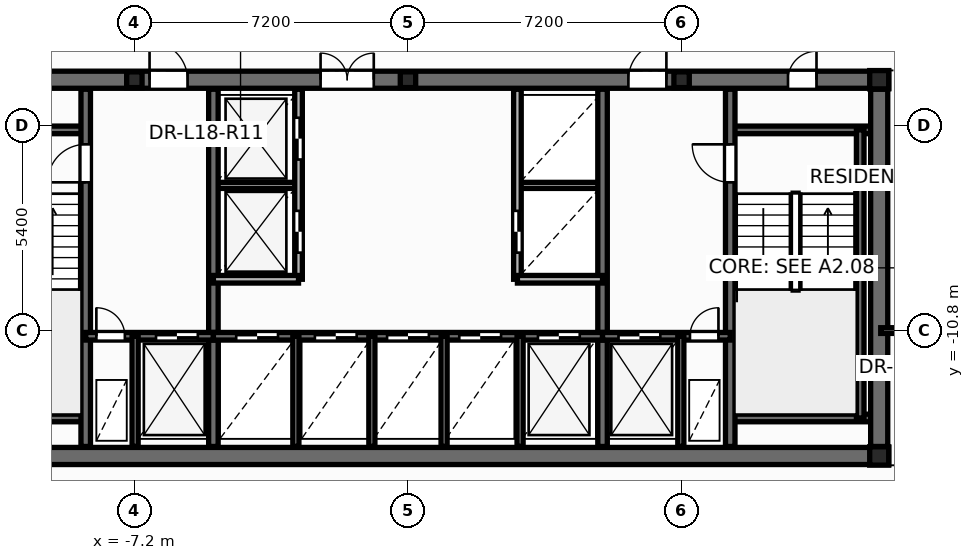
"""IFC4 building model, lengths in metres.
Left out: names, types, materials, properties, quantities, classifications, styles, units other than length and angle.
Written with IfcOpenShell. Run it as: python <this file> out.ifc"""

import sys

from ifc_helpers import new_model, si_unit, direction, frame, frame_2d, origin, origin_2d, place, context, subcontext, project, spatial, rectangle, i_section, extrude, element, fill, save


model = new_model("IFC4")
c1 = context("Model", 3, precision=1e-05, world=origin(), true_north=direction((0.0, 1.0)))
c2 = subcontext(c1, "Body", "Model", "MODEL_VIEW")
j1 = project(units=[si_unit("LENGTHUNIT", "METRE"), si_unit("PLANEANGLEUNIT", "RADIAN")], contexts=[c1])
p1 = place(None, origin())
s1 = spatial("IfcSite", under=j1, at=p1, CompositionType="ELEMENT")
p2 = place(p1, origin())
s2 = spatial("IfcBuilding", under=s1, at=p2, CompositionType="ELEMENT")
p3 = place(p2, frame((0.0, 0.0, 72.0)))
s3 = spatial("IfcBuildingStorey", under=s2, at=p3, CompositionType="ELEMENT", Elevation=72.0)
for number, where, z_axis, x_axis in (
    (1, (12.4, -14.1, 0.0), (0.0, 0.0, 1.0), (1.0, 0.0, 0.0)),
    (2, (12.4, -4.2, 0.0), (0.0, 0.0, 1.0), (1.0, 0.0, 0.0)),
):
    element("IfcColumn", number, at=place(p3, frame(where, z_axis=z_axis, x_axis=x_axis)), inside=s3, PredefinedType="COLUMN", context=c2, shape_type="SweptSolid", body=[
        extrude(i_section(OverallWidth=0.5, OverallDepth=0.482, WebThickness=0.04, FlangeThickness=0.045, at=origin_2d()), origin(), (0.0, 0.0, 1.0), 3.6),
    ])
for number, where, z_axis, x_axis in (
    (3, (-7.2, -4.2, 0.0), (0.0, 0.0, 1.0), (1.0, 0.0, 0.0)),
    (4, (0.0, -4.2, 0.0), (0.0, 0.0, 1.0), (1.0, 0.0, 0.0)),
    (5, (7.2, -4.2, 0.0), (0.0, 0.0, 1.0), (1.0, 0.0, 0.0)),
):
    element("IfcColumn", number, at=place(p3, frame(where, z_axis=z_axis, x_axis=x_axis)), inside=s3, PredefinedType="PILASTER", context=c2, shape_type="SweptSolid", body=[
        extrude(i_section(OverallWidth=0.405, OverallDepth=0.414, WebThickness=0.022, FlangeThickness=0.032, at=origin_2d()), origin(), (0.0, 0.0, 1.0), 3.6),
    ])
for number, where, z_axis, x_axis in (
    (6, (-5.12, -6.98, 0.0), (0.0, 0.0, 1.0), (1.0, 0.0, 0.0)),
    (7, (2.88, -6.98, 0.0), (0.0, 0.0, 1.0), (1.0, 0.0, 0.0)),
):
    element("IfcWall", number, at=place(p3, frame(where, z_axis=z_axis, x_axis=x_axis)), inside=s3, PredefinedType="PARTITIONING", context=c2, shape_type="SweptSolid", body=[
        extrude(rectangle(XDim=2.24, YDim=0.16, at=frame_2d((1.12, 0.0))), origin(), (0.0, 0.0, 1.0), 3.35),
    ])
p4 = place(p3, frame((-12.65, -14.1, 0.0), z_axis=(0.0, 0.0, 1.0), x_axis=(1.0, 0.0, 0.0)))
e8 = element("IfcWall", 8, at=p4, inside=s3, PredefinedType="SHEAR", context=c2, shape_type="SweptSolid", body=[
    extrude(rectangle(XDim=25.3, YDim=0.45, at=frame_2d((12.65, 0.0))), origin(), (0.0, 0.0, 1.0), 3.6),
])
p5 = place(p3, frame((-12.65, -4.2, 0.0), z_axis=(0.0, 0.0, 1.0), x_axis=(1.0, 0.0, 0.0)))
e9 = element("IfcWall", 9, at=p5, inside=s3, PredefinedType="SHEAR", context=c2, shape_type="SweptSolid", body=[
    extrude(rectangle(XDim=25.3, YDim=0.45, at=frame_2d((12.65, 0.0))), origin(), (0.0, 0.0, 1.0), 3.6),
])
p6 = place(p5, frame((1.85, 0.0, 0.0)))
e10 = element("IfcOpeningElement", 10, at=p6, cuts=e9, PredefinedType="OPENING", context=c2, shape_type="SweptSolid", body=[
    extrude(rectangle(XDim=0.756, YDim=2.054, at=frame_2d((0.375, 1.027))), frame((0.0, 0.235, 0.0), z_axis=(0.0, -1.0, 0.0), x_axis=(1.0, 0.0, 0.0)), (0.0, 0.0, 1.0), 0.47),
])
p7 = place(p5, frame((22.65, 0.0, 0.0)))
e11 = element("IfcOpeningElement", 11, at=p7, cuts=e9, PredefinedType="OPENING", context=c2, shape_type="SweptSolid", body=[
    extrude(rectangle(XDim=0.756, YDim=2.054, at=frame_2d((0.375, 1.027))), frame((0.0, 0.235, 0.0), z_axis=(0.0, -1.0, 0.0), x_axis=(1.0, 0.0, 0.0)), (0.0, 0.0, 1.0), 0.47),
])
p8 = place(p5, frame((5.85, 0.0, 0.0)))
e12 = element("IfcOpeningElement", 12, at=p8, cuts=e9, PredefinedType="OPENING", context=c2, shape_type="SweptSolid", body=[
    extrude(rectangle(XDim=1.006, YDim=2.104, at=frame_2d((0.5, 1.052))), frame((0.0, 0.235, 0.0), z_axis=(0.0, -1.0, 0.0), x_axis=(1.0, 0.0, 0.0)), (0.0, 0.0, 1.0), 0.47),
])
p9 = place(p5, frame((10.35, 0.0, 0.0)))
e13 = element("IfcOpeningElement", 13, at=p9, cuts=e9, PredefinedType="OPENING", context=c2, shape_type="SweptSolid", body=[
    extrude(rectangle(XDim=1.406, YDim=2.154, at=frame_2d((0.7, 1.077))), frame((0.0, 0.235, 0.0), z_axis=(0.0, -1.0, 0.0), x_axis=(1.0, 0.0, 0.0)), (0.0, 0.0, 1.0), 0.47),
])
p10 = place(p5, frame((18.45, 0.0, 0.0)))
e14 = element("IfcOpeningElement", 14, at=p10, cuts=e9, PredefinedType="OPENING", context=c2, shape_type="SweptSolid", body=[
    extrude(rectangle(XDim=1.006, YDim=2.104, at=frame_2d((0.5, 1.052))), frame((0.0, 0.235, 0.0), z_axis=(0.0, -1.0, 0.0), x_axis=(1.0, 0.0, 0.0)), (0.0, 0.0, 1.0), 0.47),
])
for number, where, z_axis, x_axis in (
    (15, (-12.35, -5.52, 0.0), (0.0, 0.0, 1.0), (1.0, 0.0, 0.0)),
    (16, (-12.35, -13.1, 0.0), (0.0, 0.0, 1.0), (1.0, 0.0, 0.0)),
    (17, (8.48, -5.52, 0.0), (0.0, 0.0, 1.0), (1.0, 0.0, 0.0)),
    (18, (8.48, -13.1, 0.0), (0.0, 0.0, 1.0), (1.0, 0.0, 0.0)),
):
    element("IfcWall", number, at=place(p3, frame(where, z_axis=z_axis, x_axis=x_axis)), inside=s3, PredefinedType="SOLIDWALL", context=c2, shape_type="SweptSolid", body=[
        extrude(rectangle(XDim=3.87, YDim=0.2, at=frame_2d((1.935, 0.0))), origin(), (0.0, 0.0, 1.0), 3.6),
    ])
p11 = place(p3, frame((11.9, -13.1, 0.0), z_axis=(0.0, 0.0, 1.0), x_axis=(0.0, 1.0, 0.0)))
e19 = element("IfcWall", 19, at=p11, inside=s3, PredefinedType="SOLIDWALL", context=c2, shape_type="SweptSolid", body=[
    extrude(rectangle(XDim=7.58, YDim=0.2, at=frame_2d((3.79, 0.0))), origin(), (0.0, 0.0, 1.0), 3.6),
])
p12 = place(p3, frame((-8.48, -13.85, 0.0), z_axis=(0.0, 0.0, 1.0), x_axis=(0.0, 1.0, 0.0)))
e20 = element("IfcWall", 20, at=p12, inside=s3, PredefinedType="SHEAR", context=c2, shape_type="SweptSolid", body=[
    extrude(rectangle(XDim=9.4, YDim=0.25, at=frame_2d((4.7, 0.0))), origin(), (0.0, 0.0, 1.0), 3.6),
])
p13 = place(p12, frame((6.95, 0.0, 0.0)))
e21 = element("IfcOpeningElement", 21, at=p13, cuts=e20, PredefinedType="OPENING", context=c2, shape_type="SweptSolid", body=[
    extrude(rectangle(XDim=1.006, YDim=2.104, at=frame_2d((0.5, 1.052))), frame((0.0, 0.135, 0.0), z_axis=(0.0, -1.0, 0.0), x_axis=(1.0, 0.0, 0.0)), (0.0, 0.0, 1.0), 0.27),
])
p14 = place(p3, frame((8.48, -13.85, 0.0), z_axis=(0.0, 0.0, 1.0), x_axis=(0.0, 1.0, 0.0)))
e22 = element("IfcWall", 22, at=p14, inside=s3, PredefinedType="SHEAR", context=c2, shape_type="SweptSolid", body=[
    extrude(rectangle(XDim=9.4, YDim=0.25, at=frame_2d((4.7, 0.0))), origin(), (0.0, 0.0, 1.0), 3.6),
])
p15 = place(p14, frame((6.95, 0.0, 0.0)))
e23 = element("IfcOpeningElement", 23, at=p15, cuts=e22, PredefinedType="OPENING", context=c2, shape_type="SweptSolid", body=[
    extrude(rectangle(XDim=1.006, YDim=2.104, at=frame_2d((0.5, 1.052))), frame((0.0, 0.135, 0.0), z_axis=(0.0, -1.0, 0.0), x_axis=(1.0, 0.0, 0.0)), (0.0, 0.0, 1.0), 0.27),
])
for number, where, z_axis, x_axis in (
    (24, (-5.12, -13.85, 0.0), (0.0, 0.0, 1.0), (0.0, 1.0, 0.0)),
    (25, (5.12, -13.85, 0.0), (0.0, 0.0, 1.0), (0.0, 1.0, 0.0)),
):
    element("IfcWall", number, at=place(p3, frame(where, z_axis=z_axis, x_axis=x_axis)), inside=s3, PredefinedType="SHEAR", context=c2, shape_type="SweptSolid", body=[
        extrude(rectangle(XDim=9.4, YDim=0.25, at=frame_2d((4.7, 0.0))), origin(), (0.0, 0.0, 1.0), 3.6),
    ])
p16 = place(p3, frame((-8.48, -10.95, 0.0), z_axis=(0.0, 0.0, 1.0), x_axis=(1.0, 0.0, 0.0)))
e26 = element("IfcWall", 26, at=p16, inside=s3, PredefinedType="SOLIDWALL", context=c2, shape_type="SweptSolid", body=[
    extrude(rectangle(XDim=3.36, YDim=0.2, at=frame_2d((1.68, 0.0))), origin(), (0.0, 0.0, 1.0), 3.6),
])
p17 = place(p16, frame((0.28, 0.0, 0.0)))
e27 = element("IfcOpeningElement", 27, at=p17, cuts=e26, PredefinedType="OPENING", context=c2, shape_type="SweptSolid", body=[
    extrude(rectangle(XDim=0.756, YDim=2.054, at=frame_2d((0.375, 1.027))), frame((0.0, 0.11, 0.0), z_axis=(0.0, -1.0, 0.0), x_axis=(1.0, 0.0, 0.0)), (0.0, 0.0, 1.0), 0.22),
])
p18 = place(p16, frame((1.85, 0.0, 0.0)))
e28 = element("IfcOpeningElement", 28, at=p18, cuts=e26, PredefinedType="OPENING", context=c2, shape_type="SweptSolid", body=[
    extrude(rectangle(XDim=1.106, YDim=2.104, at=frame_2d((0.55, 1.052))), frame((0.0, 0.11, 0.0), z_axis=(0.0, -1.0, 0.0), x_axis=(1.0, 0.0, 0.0)), (0.0, 0.0, 1.0), 0.22),
])
p19 = place(p3, frame((-5.12, -10.95, 0.0), z_axis=(0.0, 0.0, 1.0), x_axis=(1.0, 0.0, 0.0)))
e29 = element("IfcWall", 29, at=p19, inside=s3, PredefinedType="SOLIDWALL", context=c2, shape_type="SweptSolid", body=[
    extrude(rectangle(XDim=10.24, YDim=0.2, at=frame_2d((5.12, 0.0))), origin(), (0.0, 0.0, 1.0), 3.6),
])
p20 = place(p19, frame((0.6, 0.0, 0.0)))
e30 = element("IfcOpeningElement", 30, at=p20, cuts=e29, PredefinedType="OPENING", context=c2, shape_type="SweptSolid", body=[
    extrude(rectangle(XDim=1.106, YDim=2.104, at=frame_2d((0.55, 1.052))), frame((0.0, 0.11, 0.0), z_axis=(0.0, -1.0, 0.0), x_axis=(1.0, 0.0, 0.0)), (0.0, 0.0, 1.0), 0.22),
])
p21 = place(p19, frame((2.67, 0.0, 0.0)))
e31 = element("IfcOpeningElement", 31, at=p21, cuts=e29, PredefinedType="OPENING", context=c2, shape_type="SweptSolid", body=[
    extrude(rectangle(XDim=1.106, YDim=2.104, at=frame_2d((0.55, 1.052))), frame((0.0, 0.11, 0.0), z_axis=(0.0, -1.0, 0.0), x_axis=(1.0, 0.0, 0.0)), (0.0, 0.0, 1.0), 0.22),
])
p22 = place(p19, frame((4.57, 0.0, 0.0)))
e32 = element("IfcOpeningElement", 32, at=p22, cuts=e29, PredefinedType="OPENING", context=c2, shape_type="SweptSolid", body=[
    extrude(rectangle(XDim=1.106, YDim=2.104, at=frame_2d((0.55, 1.052))), frame((0.0, 0.11, 0.0), z_axis=(0.0, -1.0, 0.0), x_axis=(1.0, 0.0, 0.0)), (0.0, 0.0, 1.0), 0.22),
])
p23 = place(p19, frame((6.47, 0.0, 0.0)))
e33 = element("IfcOpeningElement", 33, at=p23, cuts=e29, PredefinedType="OPENING", context=c2, shape_type="SweptSolid", body=[
    extrude(rectangle(XDim=1.106, YDim=2.104, at=frame_2d((0.55, 1.052))), frame((0.0, 0.11, 0.0), z_axis=(0.0, -1.0, 0.0), x_axis=(1.0, 0.0, 0.0)), (0.0, 0.0, 1.0), 0.22),
])
p24 = place(p19, frame((8.54, 0.0, 0.0)))
e34 = element("IfcOpeningElement", 34, at=p24, cuts=e29, PredefinedType="OPENING", context=c2, shape_type="SweptSolid", body=[
    extrude(rectangle(XDim=1.106, YDim=2.104, at=frame_2d((0.55, 1.052))), frame((0.0, 0.11, 0.0), z_axis=(0.0, -1.0, 0.0), x_axis=(1.0, 0.0, 0.0)), (0.0, 0.0, 1.0), 0.22),
])
p25 = place(p3, frame((5.12, -10.95, 0.0), z_axis=(0.0, 0.0, 1.0), x_axis=(1.0, 0.0, 0.0)))
e35 = element("IfcWall", 35, at=p25, inside=s3, PredefinedType="SOLIDWALL", context=c2, shape_type="SweptSolid", body=[
    extrude(rectangle(XDim=3.36, YDim=0.2, at=frame_2d((1.68, 0.0))), origin(), (0.0, 0.0, 1.0), 3.6),
])
p26 = place(p25, frame((0.42, 0.0, 0.0)))
e36 = element("IfcOpeningElement", 36, at=p26, cuts=e35, PredefinedType="OPENING", context=c2, shape_type="SweptSolid", body=[
    extrude(rectangle(XDim=1.106, YDim=2.104, at=frame_2d((0.55, 1.052))), frame((0.0, 0.11, 0.0), z_axis=(0.0, -1.0, 0.0), x_axis=(1.0, 0.0, 0.0)), (0.0, 0.0, 1.0), 0.22),
])
p27 = place(p25, frame((2.3, 0.0, 0.0)))
e37 = element("IfcOpeningElement", 37, at=p27, cuts=e35, PredefinedType="OPENING", context=c2, shape_type="SweptSolid", body=[
    extrude(rectangle(XDim=0.756, YDim=2.054, at=frame_2d((0.375, 1.027))), frame((0.0, 0.11, 0.0), z_axis=(0.0, -1.0, 0.0), x_axis=(1.0, 0.0, 0.0)), (0.0, 0.0, 1.0), 0.22),
])
for number, where, z_axis, x_axis in (
    (38, (-7.18, -13.85, 0.0), (0.0, 0.0, 1.0), (0.0, 1.0, 0.0)),
    (39, (7.18, -13.85, 0.0), (0.0, 0.0, 1.0), (0.0, 1.0, 0.0)),
    (40, (-2.95, -13.85, 0.0), (0.0, 0.0, 1.0), (0.0, 1.0, 0.0)),
    (41, (2.95, -13.85, 0.0), (0.0, 0.0, 1.0), (0.0, 1.0, 0.0)),
):
    element("IfcWall", number, at=place(p3, frame(where, z_axis=z_axis, x_axis=x_axis)), inside=s3, PredefinedType="PARTITIONING", context=c2, shape_type="SweptSolid", body=[
        extrude(rectangle(XDim=2.9, YDim=0.16, at=frame_2d((1.45, 0.0))), origin(), (0.0, 0.0, 1.0), 2.375),
    ])
p28 = place(p3, frame((12.4, -13.85, 0.0), z_axis=(0.0, 0.0, 1.0), x_axis=(0.0, 1.0, 0.0)))
e42 = element("IfcWall", 42, at=p28, inside=s3, PredefinedType="SHEAR", context=c2, shape_type="SweptSolid", body=[
    extrude(rectangle(XDim=9.4, YDim=0.45, at=frame_2d((4.7, 0.0))), origin(), (0.0, 0.0, 1.0), 3.6),
])
p29 = place(p3, frame((-2.88, -9.45, 0.0), z_axis=(0.0, 0.0, 1.0), x_axis=(0.0, 1.0, 0.0)))
e43 = element("IfcWall", 43, at=p29, inside=s3, PredefinedType="SOLIDWALL", context=c2, shape_type="SweptSolid", body=[
    extrude(rectangle(XDim=5.0, YDim=0.2, at=frame_2d((2.5, 0.0))), origin(), (0.0, 0.0, 1.0), 3.35),
])
p30 = place(p29, frame((0.7, 0.0, 0.0)))
e44 = element("IfcOpeningElement", 44, at=p30, cuts=e43, PredefinedType="OPENING", context=c2, shape_type="SweptSolid", body=[
    extrude(rectangle(XDim=1.106, YDim=2.104, at=frame_2d((0.55, 1.052))), frame((0.0, 0.11, 0.0), z_axis=(0.0, -1.0, 0.0), x_axis=(1.0, 0.0, 0.0)), (0.0, 0.0, 1.0), 0.22),
])
p31 = place(p29, frame((3.15, 0.0, 0.0)))
e45 = element("IfcOpeningElement", 45, at=p31, cuts=e43, PredefinedType="OPENING", context=c2, shape_type="SweptSolid", body=[
    extrude(rectangle(XDim=1.106, YDim=2.104, at=frame_2d((0.55, 1.052))), frame((0.0, 0.11, 0.0), z_axis=(0.0, -1.0, 0.0), x_axis=(1.0, 0.0, 0.0)), (0.0, 0.0, 1.0), 0.22),
])
p32 = place(p3, frame((-5.12, -9.45, 0.0), z_axis=(0.0, 0.0, 1.0), x_axis=(1.0, 0.0, 0.0)))
e46 = element("IfcWall", 46, at=p32, inside=s3, PredefinedType="SOLIDWALL", context=c2, shape_type="SweptSolid", body=[
    extrude(rectangle(XDim=2.24, YDim=0.2, at=frame_2d((1.12, 0.0))), origin(), (0.0, 0.0, 1.0), 3.35),
])
p33 = place(p3, frame((2.88, -9.45, 0.0), z_axis=(0.0, 0.0, 1.0), x_axis=(0.0, 1.0, 0.0)))
e47 = element("IfcWall", 47, at=p33, inside=s3, PredefinedType="SOLIDWALL", context=c2, shape_type="SweptSolid", body=[
    extrude(rectangle(XDim=5.0, YDim=0.2, at=frame_2d((2.5, 0.0))), origin(), (0.0, 0.0, 1.0), 3.35),
])
p34 = place(p33, frame((0.7, 0.0, 0.0)))
e48 = element("IfcOpeningElement", 48, at=p34, cuts=e47, PredefinedType="OPENING", context=c2, shape_type="SweptSolid", body=[
    extrude(rectangle(XDim=1.106, YDim=2.104, at=frame_2d((0.55, 1.052))), frame((0.0, 0.11, 0.0), z_axis=(0.0, -1.0, 0.0), x_axis=(1.0, 0.0, 0.0)), (0.0, 0.0, 1.0), 0.22),
])
p35 = place(p3, frame((2.88, -9.45, 0.0), z_axis=(0.0, 0.0, 1.0), x_axis=(1.0, 0.0, 0.0)))
e49 = element("IfcWall", 49, at=p35, inside=s3, PredefinedType="SOLIDWALL", context=c2, shape_type="SweptSolid", body=[
    extrude(rectangle(XDim=2.24, YDim=0.2, at=frame_2d((1.12, 0.0))), origin(), (0.0, 0.0, 1.0), 3.35),
])
for number, where, z_axis, x_axis in (
    (50, (-0.95, -13.85, 0.0), (0.0, 0.0, 1.0), (0.0, 1.0, 0.0)),
    (51, (0.95, -13.85, 0.0), (0.0, 0.0, 1.0), (0.0, 1.0, 0.0)),
):
    element("IfcWall", number, at=place(p3, frame(where, z_axis=z_axis, x_axis=x_axis)), inside=s3, PredefinedType="PARTITIONING", context=c2, shape_type="SweptSolid", body=[
        extrude(rectangle(XDim=2.9, YDim=0.16, at=frame_2d((1.45, 0.0))), origin(), (0.0, 0.0, 1.0), 2.375),
    ])
p36 = place(p3, frame((12.44, -10.8, 0.0), z_axis=(0.0, 0.0, 1.0), x_axis=(1.0, 0.0, 0.0)))
e52 = element("IfcWall", 52, at=p36, inside=s3, PredefinedType="PARTITIONING", context=c2, shape_type="SweptSolid", body=[
    extrude(rectangle(XDim=2.2, YDim=0.15, at=frame_2d((1.1, 0.0))), origin(), (0.0, 0.0, 1.0), 2.713),
])
p37 = place(p36, frame((0.459, 0.0, 0.0)))
e53 = element("IfcOpeningElement", 53, at=p37, cuts=e52, PredefinedType="OPENING", context=c2, shape_type="SweptSolid", body=[
    extrude(rectangle(XDim=0.956, YDim=2.104, at=frame_2d((0.475, 1.052))), frame((0.0, 0.085, 0.0), z_axis=(0.0, -1.0, 0.0), x_axis=(1.0, 0.0, 0.0)), (0.0, 0.0, 1.0), 0.17),
])
p38 = place(p30, origin())
e54 = element("IfcDoor", 54, at=p38, inside=s3, OperationType="DOUBLE_DOOR_SLIDING", PredefinedType="DOOR", context=c2, shape_type="SweptSolid", body=[
    extrude(rectangle(XDim=1.1, YDim=2.1, at=frame_2d((0.55, 1.05))), frame((0.0, 0.025, 0.0), z_axis=(0.0, -1.0, 0.0), x_axis=(1.0, 0.0, 0.0)), (0.0, 0.0, 1.0), 0.05),
])
fill(e44, e54)
p39 = place(p31, origin())
e55 = element("IfcDoor", 55, at=p39, inside=s3, OperationType="DOUBLE_DOOR_SLIDING", PredefinedType="DOOR", context=c2, shape_type="SweptSolid", body=[
    extrude(rectangle(XDim=1.1, YDim=2.1, at=frame_2d((0.55, 1.05))), frame((0.0, 0.025, 0.0), z_axis=(0.0, -1.0, 0.0), x_axis=(1.0, 0.0, 0.0)), (0.0, 0.0, 1.0), 0.05),
])
fill(e45, e55)
p40 = place(p34, origin())
e56 = element("IfcDoor", 56, at=p40, inside=s3, OperationType="DOUBLE_DOOR_SLIDING", PredefinedType="DOOR", context=c2, shape_type="SweptSolid", body=[
    extrude(rectangle(XDim=1.1, YDim=2.1, at=frame_2d((0.55, 1.05))), frame((0.0, 0.025, 0.0), z_axis=(0.0, -1.0, 0.0), x_axis=(1.0, 0.0, 0.0)), (0.0, 0.0, 1.0), 0.05),
])
fill(e48, e56)
p41 = place(p13, origin())
e57 = element("IfcDoor", 57, at=p41, inside=s3, OperationType="SINGLE_SWING_LEFT", PredefinedType="DOOR", context=c2, shape_type="SweptSolid", body=[
    extrude(rectangle(XDim=1.0, YDim=2.1, at=frame_2d((0.5, 1.05))), frame((0.0, 0.025, 0.0), z_axis=(0.0, -1.0, 0.0), x_axis=(1.0, 0.0, 0.0)), (0.0, 0.0, 1.0), 0.05),
])
fill(e21, e57)
p42 = place(p15, origin())
e58 = element("IfcDoor", 58, at=p42, inside=s3, OperationType="SINGLE_SWING_RIGHT", PredefinedType="DOOR", context=c2, shape_type="SweptSolid", body=[
    extrude(rectangle(XDim=1.0, YDim=2.1, at=frame_2d((0.5, 1.05))), frame((0.0, 0.025, 0.0), z_axis=(0.0, -1.0, 0.0), x_axis=(1.0, 0.0, 0.0)), (0.0, 0.0, 1.0), 0.05),
])
fill(e23, e58)
p43 = place(p17, origin())
e59 = element("IfcDoor", 59, at=p43, inside=s3, OperationType="SINGLE_SWING_LEFT", PredefinedType="DOOR", context=c2, shape_type="SweptSolid", body=[
    extrude(rectangle(XDim=0.75, YDim=2.05, at=frame_2d((0.375, 1.025))), frame((0.0, 0.025, 0.0), z_axis=(0.0, -1.0, 0.0), x_axis=(1.0, 0.0, 0.0)), (0.0, 0.0, 1.0), 0.05),
])
fill(e27, e59)
p44 = place(p18, origin())
e60 = element("IfcDoor", 60, at=p44, inside=s3, OperationType="DOUBLE_DOOR_SLIDING", PredefinedType="DOOR", context=c2, shape_type="SweptSolid", body=[
    extrude(rectangle(XDim=1.1, YDim=2.1, at=frame_2d((0.55, 1.05))), frame((0.0, 0.025, 0.0), z_axis=(0.0, -1.0, 0.0), x_axis=(1.0, 0.0, 0.0)), (0.0, 0.0, 1.0), 0.05),
])
fill(e28, e60)
p45 = place(p26, origin())
e61 = element("IfcDoor", 61, at=p45, inside=s3, OperationType="DOUBLE_DOOR_SLIDING", PredefinedType="DOOR", context=c2, shape_type="SweptSolid", body=[
    extrude(rectangle(XDim=1.1, YDim=2.1, at=frame_2d((0.55, 1.05))), frame((0.0, 0.025, 0.0), z_axis=(0.0, -1.0, 0.0), x_axis=(1.0, 0.0, 0.0)), (0.0, 0.0, 1.0), 0.05),
])
fill(e36, e61)
p46 = place(p27, origin())
e62 = element("IfcDoor", 62, at=p46, inside=s3, OperationType="SINGLE_SWING_RIGHT", PredefinedType="DOOR", context=c2, shape_type="SweptSolid", body=[
    extrude(rectangle(XDim=0.75, YDim=2.05, at=frame_2d((0.375, 1.025))), frame((0.0, 0.025, 0.0), z_axis=(0.0, -1.0, 0.0), x_axis=(1.0, 0.0, 0.0)), (0.0, 0.0, 1.0), 0.05),
])
fill(e37, e62)
p47 = place(p20, origin())
e63 = element("IfcDoor", 63, at=p47, inside=s3, OperationType="DOUBLE_DOOR_SLIDING", PredefinedType="DOOR", context=c2, shape_type="SweptSolid", body=[
    extrude(rectangle(XDim=1.1, YDim=2.1, at=frame_2d((0.55, 1.05))), frame((0.0, 0.025, 0.0), z_axis=(0.0, -1.0, 0.0), x_axis=(1.0, 0.0, 0.0)), (0.0, 0.0, 1.0), 0.05),
])
fill(e30, e63)
p48 = place(p21, origin())
e64 = element("IfcDoor", 64, at=p48, inside=s3, OperationType="DOUBLE_DOOR_SLIDING", PredefinedType="DOOR", context=c2, shape_type="SweptSolid", body=[
    extrude(rectangle(XDim=1.1, YDim=2.1, at=frame_2d((0.55, 1.05))), frame((0.0, 0.025, 0.0), z_axis=(0.0, -1.0, 0.0), x_axis=(1.0, 0.0, 0.0)), (0.0, 0.0, 1.0), 0.05),
])
fill(e31, e64)
p49 = place(p22, origin())
e65 = element("IfcDoor", 65, at=p49, inside=s3, OperationType="DOUBLE_DOOR_SLIDING", PredefinedType="DOOR", context=c2, shape_type="SweptSolid", body=[
    extrude(rectangle(XDim=1.1, YDim=2.1, at=frame_2d((0.55, 1.05))), frame((0.0, 0.025, 0.0), z_axis=(0.0, -1.0, 0.0), x_axis=(1.0, 0.0, 0.0)), (0.0, 0.0, 1.0), 0.05),
])
fill(e32, e65)
p50 = place(p23, origin())
e66 = element("IfcDoor", 66, at=p50, inside=s3, OperationType="DOUBLE_DOOR_SLIDING", PredefinedType="DOOR", context=c2, shape_type="SweptSolid", body=[
    extrude(rectangle(XDim=1.1, YDim=2.1, at=frame_2d((0.55, 1.05))), frame((0.0, 0.025, 0.0), z_axis=(0.0, -1.0, 0.0), x_axis=(1.0, 0.0, 0.0)), (0.0, 0.0, 1.0), 0.05),
])
fill(e33, e66)
p51 = place(p24, origin())
e67 = element("IfcDoor", 67, at=p51, inside=s3, OperationType="DOUBLE_DOOR_SLIDING", PredefinedType="DOOR", context=c2, shape_type="SweptSolid", body=[
    extrude(rectangle(XDim=1.1, YDim=2.1, at=frame_2d((0.55, 1.05))), frame((0.0, 0.025, 0.0), z_axis=(0.0, -1.0, 0.0), x_axis=(1.0, 0.0, 0.0)), (0.0, 0.0, 1.0), 0.05),
])
fill(e34, e67)
p52 = place(p7, origin())
e68 = element("IfcDoor", 68, at=p52, inside=s3, OperationType="SINGLE_SWING_RIGHT", PredefinedType="DOOR", context=c2, shape_type="SweptSolid", body=[
    extrude(rectangle(XDim=0.75, YDim=2.05, at=frame_2d((0.375, 1.025))), frame((0.0, 0.025, 0.0), z_axis=(0.0, -1.0, 0.0), x_axis=(1.0, 0.0, 0.0)), (0.0, 0.0, 1.0), 0.05),
])
fill(e11, e68)
p53 = place(p8, origin())
e69 = element("IfcDoor", 69, at=p53, inside=s3, OperationType="SINGLE_SWING_LEFT", PredefinedType="DOOR", context=c2, shape_type="SweptSolid", body=[
    extrude(rectangle(XDim=1.0, YDim=2.1, at=frame_2d((0.5, 1.05))), frame((0.0, 0.025, 0.0), z_axis=(0.0, -1.0, 0.0), x_axis=(1.0, 0.0, 0.0)), (0.0, 0.0, 1.0), 0.05),
])
fill(e12, e69)
p54 = place(p9, origin())
e70 = element("IfcDoor", 70, at=p54, inside=s3, OperationType="DOUBLE_DOOR_SINGLE_SWING", PredefinedType="DOOR", context=c2, shape_type="SweptSolid", body=[
    extrude(rectangle(XDim=1.4, YDim=2.15, at=frame_2d((0.7, 1.075))), frame((0.0, 0.025, 0.0), z_axis=(0.0, -1.0, 0.0), x_axis=(1.0, 0.0, 0.0)), (0.0, 0.0, 1.0), 0.05),
])
fill(e13, e70)
p55 = place(p10, origin())
e71 = element("IfcDoor", 71, at=p55, inside=s3, OperationType="SINGLE_SWING_RIGHT", PredefinedType="DOOR", context=c2, shape_type="SweptSolid", body=[
    extrude(rectangle(XDim=1.0, YDim=2.1, at=frame_2d((0.5, 1.05))), frame((0.0, 0.025, 0.0), z_axis=(0.0, -1.0, 0.0), x_axis=(1.0, 0.0, 0.0)), (0.0, 0.0, 1.0), 0.05),
])
fill(e14, e71)
save(model, sys.argv[1])
